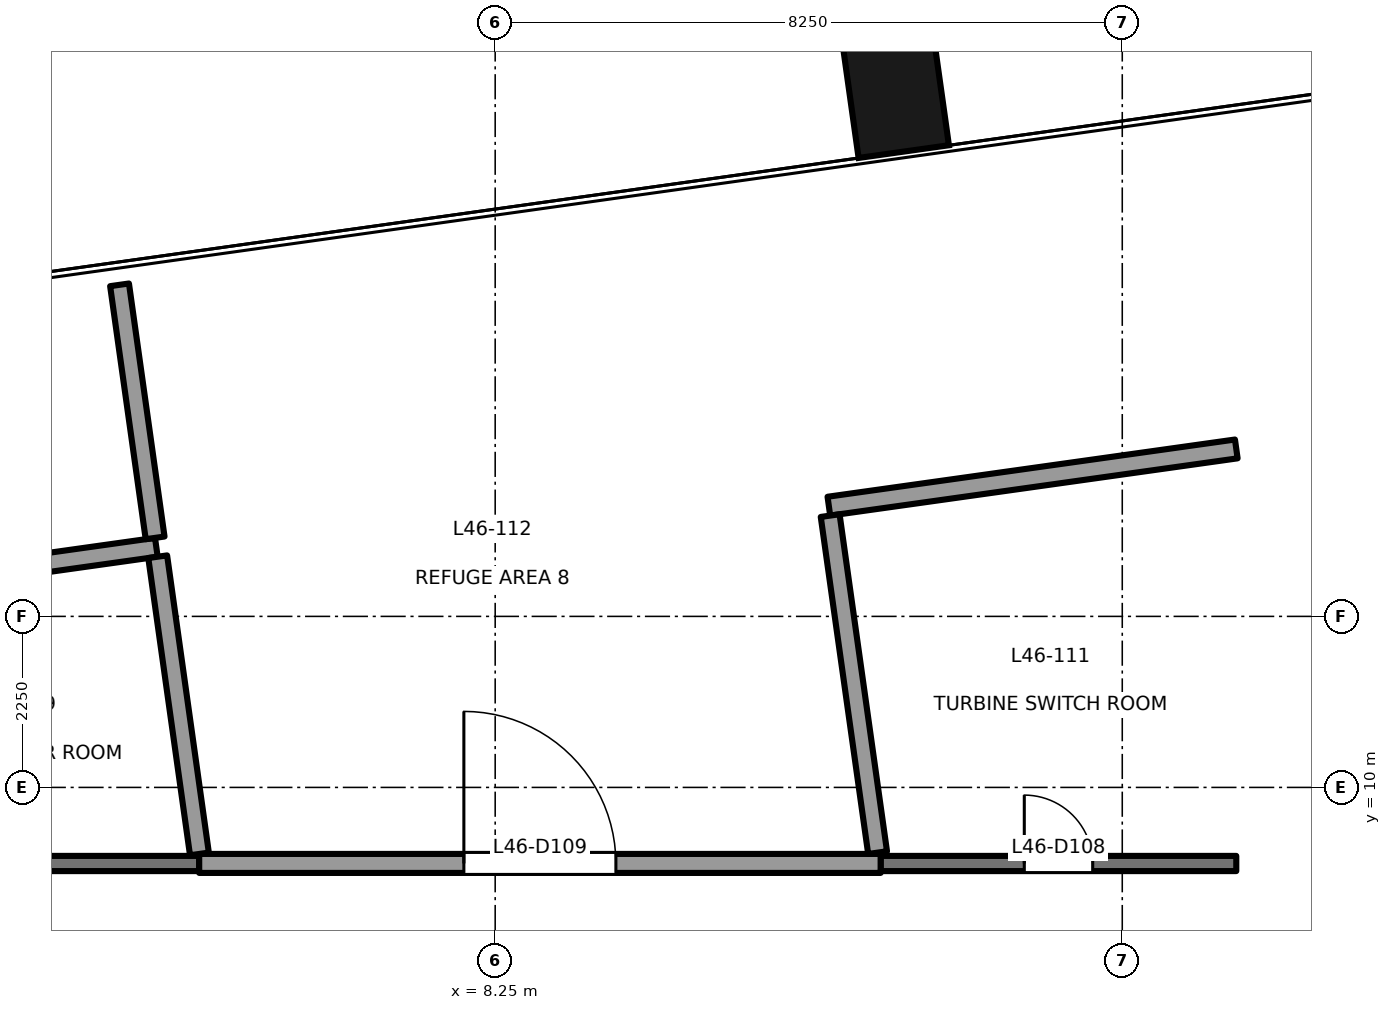
"""IFC4 building model, lengths in metres.
Left out: names, types, materials, properties, quantities, classifications, styles, units other than length and angle.
Written with IfcOpenShell. Run it as: python <this file> out.ifc"""

import sys

from ifc_helpers import new_model, si_unit, direction, frame, frame_2d, origin, origin_2d, place, context, subcontext, project, spatial, rectangle, extrude, element, fill, save


model = new_model("IFC4")
c1 = context("Model", 3, precision=1e-05, world=origin(), true_north=direction((0.0, 1.0)))
c2 = subcontext(c1, "Body", "Model", "MODEL_VIEW")
j1 = project(units=[si_unit("LENGTHUNIT", "METRE"), si_unit("PLANEANGLEUNIT", "RADIAN")], contexts=[c1])
p1 = place(None, origin())
s1 = spatial("IfcSite", under=j1, at=p1, CompositionType="ELEMENT")
p2 = place(p1, origin())
s2 = spatial("IfcBuilding", under=s1, at=p2, CompositionType="ELEMENT")
p3 = place(p2, frame((0.0, 0.0, 199.7)))
s3 = spatial("IfcBuildingStorey", under=s2, at=p3, CompositionType="ELEMENT", Elevation=199.7)
p4 = place(p3, frame((13.5, 19.256, -0.2), z_axis=(0.0, 0.0, 1.0), x_axis=(0.99027049762, 0.139155817501, 0.0)))
e1 = element("IfcColumn", 1, at=p4, inside=s3, PredefinedType="COLUMN", context=c2, shape_type="SweptSolid", body=[
    extrude(rectangle(XDim=1.2, YDim=1.8, at=origin_2d()), origin(), (0.0, 0.0, 1.0), 8.4),
])
p5 = place(p3, frame((-1.559, 8.999, 0.0), z_axis=(0.0, 0.0, 1.0), x_axis=(1.0, 0.0, 0.0)))
e2 = element("IfcWall", 2, at=p5, inside=s3, PredefinedType="PARTITIONING", context=c2, shape_type="SweptSolid", body=[
    extrude(rectangle(XDim=5.915, YDim=0.2, at=frame_2d((2.958, 0.0))), origin(), (0.0, 0.0, 1.0), 7.9),
])
p6 = place(p5, frame((2.508, 0.0, 0.0)))
e3 = element("IfcOpeningElement", 3, at=p6, cuts=e2, PredefinedType="OPENING", context=c2, shape_type="SweptSolid", body=[
    extrude(rectangle(XDim=0.9, YDim=2.1, at=frame_2d((0.45, 1.05))), frame((0.0, 0.111, 0.0), z_axis=(0.0, -1.0, 0.0), x_axis=(1.0, 0.0, 0.0)), (0.0, 0.0, 1.0), 0.221),
])
p7 = place(p3, frame((13.321, 8.999, 0.0), z_axis=(0.0, 0.0, 1.0), x_axis=(1.0, 0.0, 0.0)))
e4 = element("IfcWall", 4, at=p7, inside=s3, PredefinedType="PARTITIONING", context=c2, shape_type="SweptSolid", body=[
    extrude(rectangle(XDim=4.679, YDim=0.2, at=frame_2d((2.339, 0.0))), origin(), (0.0, 0.0, 1.0), 7.84),
])
p8 = place(p7, frame((1.89, 0.0, 0.0)))
e5 = element("IfcOpeningElement", 5, at=p8, cuts=e4, PredefinedType="OPENING", context=c2, shape_type="SweptSolid", body=[
    extrude(rectangle(XDim=0.9, YDim=2.1, at=frame_2d((0.45, 1.05))), frame((0.0, 0.111, 0.0), z_axis=(0.0, -1.0, 0.0), x_axis=(1.0, 0.0, 0.0)), (0.0, 0.0, 1.0), 0.221),
])
p9 = place(p3, frame((4.356, 9.0, 0.0), z_axis=(0.0, 0.0, 1.0), x_axis=(1.0, 0.0, 0.0)))
e6 = element("IfcWall", 6, at=p9, inside=s3, PredefinedType="PARTITIONING", context=c2, shape_type="SweptSolid", body=[
    extrude(rectangle(XDim=8.965, YDim=0.25, at=frame_2d((4.482, 0.0))), origin(), (0.0, 0.0, 1.0), 7.84),
])
p10 = place(p9, frame((3.482, 0.0, 0.0)))
e7 = element("IfcOpeningElement", 7, at=p10, cuts=e6, PredefinedType="OPENING", context=c2, shape_type="SweptSolid", body=[
    extrude(rectangle(XDim=2.0, YDim=2.1, at=frame_2d((1.0, 1.05))), frame((0.0, 0.135, 0.0), z_axis=(0.0, -1.0, 0.0), x_axis=(1.0, 0.0, 0.0)), (0.0, 0.0, 1.0), 0.271),
])
p11 = place(p3, frame((-2.149, 12.324, 0.0), z_axis=(0.0, 0.0, 1.0), x_axis=(0.990267623823, 0.139176266683, 0.0)))
e8 = element("IfcWall", 8, at=p11, inside=s3, PredefinedType="PARTITIONING", context=c2, shape_type="SweptSolid", body=[
    extrude(rectangle(XDim=5.999, YDim=0.25, at=frame_2d((3.0, 0.0))), origin(), (0.0, 0.0, 1.0), 6.15),
])
p12 = place(p3, frame((3.81, 13.035, 0.0), z_axis=(0.0, 0.0, 1.0), x_axis=(0.139005650311, -0.990291587959, 0.0)))
e9 = element("IfcWall", 9, at=p12, inside=s3, PredefinedType="PARTITIONING", context=c2, shape_type="SweptSolid", body=[
    extrude(rectangle(XDim=3.948, YDim=0.25, at=frame_2d((1.974, 0.0))), origin(), (0.0, 0.0, 1.0), 7.1),
])
p13 = place(p3, frame((3.308, 16.612, 0.0), z_axis=(0.0, 0.0, 1.0), x_axis=(0.139143559235, -0.990272220111, 0.0)))
e10 = element("IfcWall", 10, at=p13, inside=s3, PredefinedType="PARTITIONING", context=c2, shape_type="SweptSolid", body=[
    extrude(rectangle(XDim=3.362, YDim=0.25, at=frame_2d((1.681, 0.0))), origin(), (0.0, 0.0, 1.0), 8.2),
])
p14 = place(p3, frame((12.64, 13.7, 0.0), z_axis=(0.0, 0.0, 1.0), x_axis=(0.990277850905, 0.13910347949, 0.0)))
e11 = element("IfcWall", 11, at=p14, inside=s3, PredefinedType="PARTITIONING", context=c2, shape_type="SweptSolid", body=[
    extrude(rectangle(XDim=5.413, YDim=0.25, at=frame_2d((2.707, 0.0))), origin(), (0.0, 0.0, 1.0), 7.84),
])
p15 = place(p3, frame((13.281, 9.142, 0.0), z_axis=(0.0, 0.0, 1.0), x_axis=(-0.139367615221, 0.990240712063, 0.0)))
e12 = element("IfcWall", 12, at=p15, inside=s3, PredefinedType="PARTITIONING", context=c2, shape_type="SweptSolid", body=[
    extrude(rectangle(XDim=4.478, YDim=0.25, at=frame_2d((2.239, 0.0))), origin(), (0.0, 0.0, 1.0), 8.2),
])
p16 = place(p8, origin())
e13 = element("IfcDoor", 13, at=p16, inside=s3, OperationType="SINGLE_SWING_LEFT", PredefinedType="DOOR", context=c2, shape_type="SweptSolid", body=[
    extrude(rectangle(XDim=0.9, YDim=2.1, at=frame_2d((0.45, 1.05))), frame((0.0, 0.025, 0.0), z_axis=(0.0, -1.0, 0.0), x_axis=(1.0, 0.0, 0.0)), (0.0, 0.0, 1.0), 0.05),
])
fill(e5, e13)
p17 = place(p10, origin())
e14 = element("IfcDoor", 14, at=p17, inside=s3, OperationType="DOUBLE_DOOR_SINGLE_SWING", PredefinedType="DOOR", context=c2, shape_type="SweptSolid", body=[
    extrude(rectangle(XDim=2.0, YDim=2.1, at=frame_2d((1.0, 1.05))), frame((0.0, 0.025, 0.0), z_axis=(0.0, -1.0, 0.0), x_axis=(1.0, 0.0, 0.0)), (0.0, 0.0, 1.0), 0.05),
])
fill(e7, e14)
save(model, sys.argv[1])
